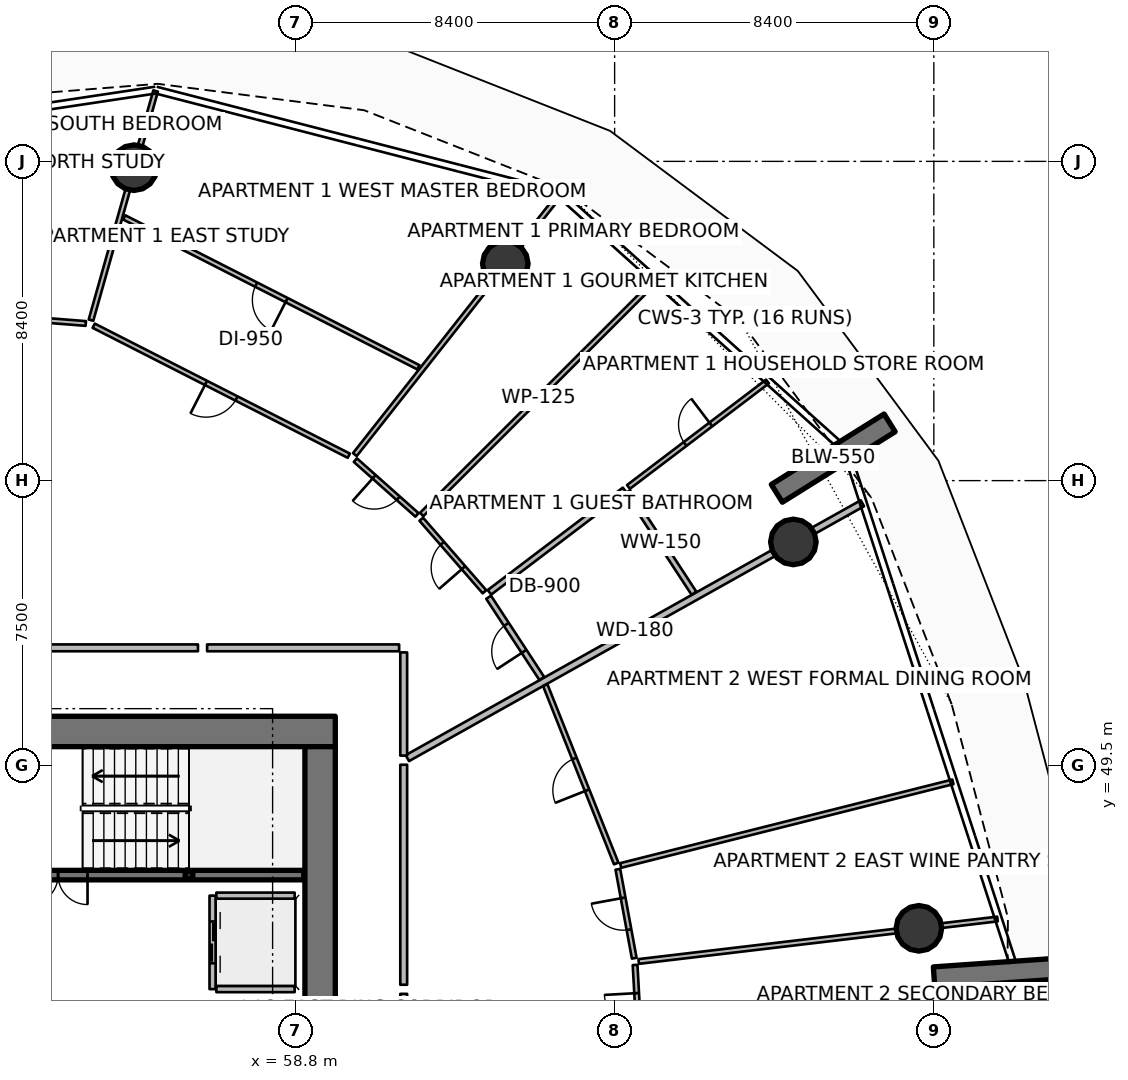
"""IFC4 building model, lengths in metres.
Left out: names, types, materials, properties, quantities, classifications, styles, units other than length and angle.
Written with IfcOpenShell. Run it as: python <this file> out.ifc"""

import sys

from ifc_helpers import new_model, si_unit, direction, frame, frame_2d, origin, origin_2d, place, context, subcontext, project, spatial, rectangle, hollow_rectangle, circle, extrude, element, fill, save


model = new_model("IFC4")
c1 = context("Model", 3, precision=1e-05, world=origin(), true_north=direction((0.0, 1.0)))
c2 = subcontext(c1, "Body", "Model", "MODEL_VIEW")
j1 = project(units=[si_unit("LENGTHUNIT", "METRE"), si_unit("PLANEANGLEUNIT", "RADIAN")], contexts=[c1])
p1 = place(None, origin())
s1 = spatial("IfcSite", under=j1, at=p1, CompositionType="ELEMENT")
p2 = place(p1, origin())
s2 = spatial("IfcBuilding", under=s1, at=p2, CompositionType="ELEMENT")
p3 = place(p2, frame((0.0, 0.0, 75.15)))
s3 = spatial("IfcBuildingStorey", under=s2, at=p3, CompositionType="ELEMENT", Elevation=75.15)
p4 = place(p3, frame((49.95, 50.4, 0.0), z_axis=(0.0, 0.0, 1.0), x_axis=(1.0, 0.0, 0.0)))
e1 = element("IfcWall", 1, at=p4, inside=s3, PredefinedType="SHEAR", context=c2, shape_type="SweptSolid", body=[
    extrude(rectangle(XDim=9.9, YDim=0.8, at=frame_2d((4.95, 0.0))), origin(), (0.0, 0.0, 1.0), 3.75),
])
p5 = place(p3, frame((59.45, 34.0, 0.0), z_axis=(0.0, 0.0, 1.0), x_axis=(0.0, 1.0, 0.0)))
e2 = element("IfcWall", 2, at=p5, inside=s3, PredefinedType="SHEAR", context=c2, shape_type="SweptSolid", body=[
    extrude(rectangle(XDim=16.0, YDim=0.8, at=frame_2d((8.0, 0.0))), origin(), (0.0, 0.0, 1.0), 3.75),
])
p6 = place(p3, frame((56.0, 46.62, 0.0), z_axis=(0.0, 0.0, 1.0), x_axis=(1.0, 0.0, 0.0)))
e3 = element("IfcColumn", 3, at=p6, inside=s3, PredefinedType="COLUMN", context=c2, shape_type="SweptSolid", body=[
    extrude(hollow_rectangle(XDim=0.2, YDim=0.2, WallThickness=0.01, InnerFilletRadius=0.01, OuterFilletRadius=0.02, at=origin_2d()), origin(), (0.0, 0.0, 1.0), 1.67),
])
for number, where, z_axis, x_axis in (
    (4, (71.469, 56.665, 0.0), (0.0, 0.0, 1.0), (0.848, 0.53, 0.0)),
    (5, (75.606, 43.93, 0.0), (0.0, 0.0, 1.0), (0.998, 0.07, 0.0)),
):
    element("IfcWall", number, at=place(p3, frame(where, z_axis=z_axis, x_axis=x_axis)), inside=s3, PredefinedType="SOLIDWALL", context=c2, shape_type="SweptSolid", body=[
        extrude(rectangle(XDim=3.5, YDim=0.55, at=frame_2d((1.75, 0.0))), origin(), (0.0, 0.0, 1.0), 3.75),
    ])
for number, where, z_axis, x_axis in (
    (6, (71.903, 55.386, 0.0), (0.0, 0.0, 1.0), (1.0, 0.0, 0.0)),
    (7, (64.323, 62.706, 0.0), (0.0, 0.0, 1.0), (1.0, 0.0, 0.0)),
    (8, (54.553, 65.234, 0.0), (0.0, 0.0, 1.0), (1.0, 0.0, 0.0)),
    (9, (75.207, 45.22, 0.0), (0.0, 0.0, 1.0), (1.0, 0.0, 0.0)),
):
    element("IfcColumn", number, at=place(p3, frame(where, z_axis=z_axis, x_axis=x_axis)), inside=s3, PredefinedType="COLUMN", context=c2, shape_type="SweptSolid", body=[
        extrude(circle(Radius=0.6, at=origin_2d()), origin(), (0.0, 0.0, 1.0), 3.5),
    ])
p7 = place(p3, frame((51.48, 46.62, 0.0), z_axis=(0.0, 0.0, 1.0), x_axis=(1.0, 0.0, 0.0)))
e10 = element("IfcWall", 10, at=p7, inside=s3, PredefinedType="SOLIDWALL", context=c2, shape_type="SweptSolid", body=[
    extrude(rectangle(XDim=7.54, YDim=0.25, at=frame_2d((3.77, 0.0))), origin(), (0.0, 0.0, 1.0), 3.5),
])
p8 = place(p7, frame((0.3, 0.0, 0.0)))
e11 = element("IfcOpeningElement", 11, at=p8, cuts=e10, PredefinedType="OPENING", context=c2, shape_type="SweptSolid", body=[
    extrude(rectangle(XDim=1.55, YDim=2.15, at=frame_2d((0.775, 1.075))), frame((0.0, 0.135, 0.0), z_axis=(0.0, -1.0, 0.0), x_axis=(1.0, 0.0, 0.0)), (0.0, 0.0, 1.0), 0.27),
])
p9 = place(p3, frame((56.62, 46.08, 0.0), z_axis=(0.0, 0.0, 1.0), x_axis=(0.0, -1.0, 0.0)))
e12 = element("IfcWall", 12, at=p9, inside=s3, PredefinedType="PARTITIONING", context=c2, shape_type="SweptSolid", body=[
    extrude(rectangle(XDim=2.46, YDim=0.16, at=frame_2d((1.23, 0.0))), origin(), (0.0, 0.0, 1.0), 3.5),
])
p10 = place(p9, frame((0.68, 0.0, 0.0)))
e13 = element("IfcOpeningElement", 13, at=p10, cuts=e12, PredefinedType="OPENING", context=c2, shape_type="SweptSolid", body=[
    extrude(rectangle(XDim=1.1, YDim=2.1, at=frame_2d((0.55, 1.05))), frame((0.0, 0.09, 0.0), z_axis=(0.0, -1.0, 0.0), x_axis=(1.0, 0.0, 0.0)), (0.0, 0.0, 1.0), 0.18),
])
for number, where, z_axis, x_axis in (
    (14, (56.72, 46.08, 0.0), (0.0, 0.0, 1.0), (1.0, 0.0, 0.0)),
    (15, (56.72, 43.62, 0.0), (0.0, 0.0, 1.0), (1.0, 0.0, 0.0)),
):
    element("IfcWall", number, at=place(p3, frame(where, z_axis=z_axis, x_axis=x_axis)), inside=s3, PredefinedType="PARTITIONING", context=c2, shape_type="SweptSolid", body=[
        extrude(rectangle(XDim=2.06, YDim=0.16, at=frame_2d((1.03, 0.0))), origin(), (0.0, 0.0, 1.0), 3.5),
    ])
p11 = place(p3, frame((61.746, 49.698, 0.0), z_axis=(0.0, 0.0, 1.0), x_axis=(0.872489938668, 0.488632077256, 0.0)))
e16 = element("IfcWall", 16, at=p11, inside=s3, PredefinedType="PARTITIONING", context=c2, shape_type="SweptSolid", body=[
    extrude(rectangle(XDim=13.725, YDim=0.18, at=frame_2d((6.862, 0.0))), origin(), (0.0, 0.0, 1.0), 2.94),
])
p12 = place(p3, frame((61.65, 49.764, 0.0), z_axis=(0.0, 0.0, 1.0), x_axis=(0.0, 1.0, 0.0)))
e17 = element("IfcWall", 17, at=p12, inside=s3, PredefinedType="PARTITIONING", context=c2, shape_type="SweptSolid", body=[
    extrude(rectangle(XDim=2.716, YDim=0.18, at=frame_2d((1.358, 0.0))), origin(), (0.0, 0.0, 1.0), 2.94),
])
p13 = place(p3, frame((61.53, 52.6, 0.0), z_axis=(0.0, 0.0, 1.0), x_axis=(-1.0, 0.0, 0.0)))
e18 = element("IfcWall", 18, at=p13, inside=s3, PredefinedType="PARTITIONING", context=c2, shape_type="SweptSolid", body=[
    extrude(rectangle(XDim=5.054, YDim=0.18, at=frame_2d((2.527, 0.0))), origin(), (0.0, 0.0, 1.0), 2.94),
])
p14 = place(p3, frame((65.283, 51.794, 0.0), z_axis=(0.0, 0.0, 1.0), x_axis=(-0.547733379914, 0.836652941505, 0.0)))
e19 = element("IfcWall", 19, at=p14, inside=s3, PredefinedType="PARTITIONING", context=c2, shape_type="SweptSolid", body=[
    extrude(rectangle(XDim=2.554, YDim=0.15, at=frame_2d((1.277, 0.0))), origin(), (0.0, 0.0, 1.0), 2.94),
])
p15 = place(p14, frame((0.852, 0.0, 0.0)))
e20 = element("IfcOpeningElement", 20, at=p15, cuts=e19, PredefinedType="OPENING", context=c2, shape_type="SweptSolid", body=[
    extrude(rectangle(XDim=0.85, YDim=2.06, at=frame_2d((0.425, 1.03))), frame((0.0, 0.085, 0.0), z_axis=(0.0, -1.0, 0.0), x_axis=(1.0, 0.0, 0.0)), (0.0, 0.0, 1.0), 0.17),
])
p16 = place(p3, frame((69.288, 54.036, 0.0), z_axis=(0.0, 0.0, 1.0), x_axis=(-0.547701082521, 0.836674084818, 0.0)))
e21 = element("IfcWall", 21, at=p16, inside=s3, PredefinedType="PARTITIONING", context=c2, shape_type="SweptSolid", body=[
    extrude(rectangle(XDim=3.188, YDim=0.15, at=frame_2d((1.594, 0.0))), origin(), (0.0, 0.0, 1.0), 2.94),
])
p17 = place(p3, frame((63.906, 54.061, 0.0), z_axis=(0.0, 0.0, 1.0), x_axis=(0.796875731809, 0.604143251269, 0.0)))
e22 = element("IfcWall", 22, at=p17, inside=s3, PredefinedType="PARTITIONING", context=c2, shape_type="SweptSolid", body=[
    extrude(rectangle(XDim=4.46, YDim=0.15, at=frame_2d((2.23, 0.0))), origin(), (0.0, 0.0, 1.0), 2.94),
])
p18 = place(p3, frame((67.564, 56.834, 0.0), z_axis=(0.0, 0.0, 1.0), x_axis=(0.796836075133, 0.604195555567, 0.0)))
e23 = element("IfcWall", 23, at=p18, inside=s3, PredefinedType="PARTITIONING", context=c2, shape_type="SweptSolid", body=[
    extrude(rectangle(XDim=4.59, YDim=0.125, at=frame_2d((2.295, 0.0))), origin(), (0.0, 0.0, 1.0), 2.94),
])
p19 = place(p18, frame((1.87, 0.0, 0.0)))
e24 = element("IfcOpeningElement", 24, at=p19, cuts=e23, PredefinedType="OPENING", context=c2, shape_type="SweptSolid", body=[
    extrude(rectangle(XDim=0.85, YDim=2.06, at=frame_2d((0.425, 1.03))), frame((0.0, 0.073, 0.0), z_axis=(0.0, -1.0, 0.0), x_axis=(1.0, 0.0, 0.0)), (0.0, 0.0, 1.0), 0.145),
])
p20 = place(p3, frame((62.123, 56.108, 0.0), z_axis=(0.0, 0.0, 1.0), x_axis=(0.707471753943, 0.706741619953, 0.0)))
e25 = element("IfcWall", 25, at=p20, inside=s3, PredefinedType="PARTITIONING", context=c2, shape_type="SweptSolid", body=[
    extrude(rectangle(XDim=8.694, YDim=0.125, at=frame_2d((4.347, 0.0))), origin(), (0.0, 0.0, 1.0), 2.94),
])
p21 = place(p3, frame((63.776, 54.074, 0.0), z_axis=(0.0, 0.0, 1.0), x_axis=(-0.657015843491, 0.753876768048, 0.0)))
e26 = element("IfcWall", 26, at=p21, inside=s3, PredefinedType="PARTITIONING", context=c2, shape_type="SweptSolid", body=[
    extrude(rectangle(XDim=2.533, YDim=0.125, at=frame_2d((1.267, 0.0))), origin(), (0.0, 0.0, 1.0), 2.94),
])
p22 = place(p21, frame((0.842, 0.0, 0.0)))
e27 = element("IfcOpeningElement", 27, at=p22, cuts=e26, PredefinedType="OPENING", context=c2, shape_type="SweptSolid", body=[
    extrude(rectangle(XDim=0.85, YDim=2.06, at=frame_2d((0.425, 1.03))), frame((0.0, 0.073, 0.0), z_axis=(0.0, -1.0, 0.0), x_axis=(1.0, 0.0, 0.0)), (0.0, 0.0, 1.0), 0.145),
])
p23 = place(p3, frame((61.999, 56.097, 0.0), z_axis=(0.0, 0.0, 1.0), x_axis=(-0.747347245647, 0.664433664427, 0.0)))
e28 = element("IfcWall", 28, at=p23, inside=s3, PredefinedType="PARTITIONING", context=c2, shape_type="SweptSolid", body=[
    extrude(rectangle(XDim=2.17, YDim=0.125, at=frame_2d((1.085, 0.0))), origin(), (0.0, 0.0, 1.0), 2.94),
])
p24 = place(p23, frame((0.66, 0.0, 0.0)))
e29 = element("IfcOpeningElement", 29, at=p24, cuts=e28, PredefinedType="OPENING", context=c2, shape_type="SweptSolid", body=[
    extrude(rectangle(XDim=0.85, YDim=2.06, at=frame_2d((0.425, 1.03))), frame((0.0, 0.073, 0.0), z_axis=(0.0, -1.0, 0.0), x_axis=(1.0, 0.0, 0.0)), (0.0, 0.0, 1.0), 0.145),
])
p25 = place(p3, frame((56.236, 52.6, 0.0), z_axis=(0.0, 0.0, 1.0), x_axis=(-1.0, 0.0, 0.0)))
e30 = element("IfcWall", 30, at=p25, inside=s3, PredefinedType="PARTITIONING", context=c2, shape_type="SweptSolid", body=[
    extrude(rectangle(XDim=5.127, YDim=0.18, at=frame_2d((2.563, 0.0))), origin(), (0.0, 0.0, 1.0), 2.94),
])
p26 = place(p3, frame((60.365, 57.684, 0.0), z_axis=(0.0, 0.0, 1.0), x_axis=(0.619089966413, 0.785320070727, 0.0)))
e31 = element("IfcWall", 31, at=p26, inside=s3, PredefinedType="PARTITIONING", context=c2, shape_type="SweptSolid", body=[
    extrude(rectangle(XDim=8.699, YDim=0.125, at=frame_2d((4.35, 0.0))), origin(), (0.0, 0.0, 1.0), 2.94),
])
p27 = place(p3, frame((60.205, 57.656, 0.0), z_axis=(0.0, 0.0, 1.0), x_axis=(-0.891005117697, 0.453993260123, 0.0)))
e32 = element("IfcWall", 32, at=p27, inside=s3, PredefinedType="PARTITIONING", context=c2, shape_type="SweptSolid", body=[
    extrude(rectangle(XDim=7.533, YDim=0.125, at=frame_2d((3.767, 0.0))), origin(), (0.0, 0.0, 1.0), 2.94),
])
p28 = place(p27, frame((3.317, 0.0, 0.0)))
e33 = element("IfcOpeningElement", 33, at=p28, cuts=e32, PredefinedType="OPENING", context=c2, shape_type="SweptSolid", body=[
    extrude(rectangle(XDim=0.9, YDim=2.08, at=frame_2d((0.45, 1.04))), frame((0.0, 0.073, 0.0), z_axis=(0.0, -1.0, 0.0), x_axis=(1.0, 0.0, 0.0)), (0.0, 0.0, 1.0), 0.145),
])
p29 = place(p3, frame((62.038, 59.981, 0.0), z_axis=(0.0, 0.0, 1.0), x_axis=(-0.891001540604, 0.454000280442, 0.0)))
e34 = element("IfcWall", 34, at=p29, inside=s3, PredefinedType="PARTITIONING", context=c2, shape_type="SweptSolid", body=[
    extrude(rectangle(XDim=8.689, YDim=0.125, at=frame_2d((4.344, 0.0))), origin(), (0.0, 0.0, 1.0), 2.94),
])
p30 = place(p29, frame((3.895, 0.0, 0.0)))
e35 = element("IfcOpeningElement", 35, at=p30, cuts=e34, PredefinedType="OPENING", context=c2, shape_type="SweptSolid", body=[
    extrude(rectangle(XDim=0.9, YDim=2.08, at=frame_2d((0.45, 1.04))), frame((0.0, 0.073, 0.0), z_axis=(0.0, -1.0, 0.0), x_axis=(1.0, 0.0, 0.0)), (0.0, 0.0, 1.0), 0.145),
])
p31 = place(p3, frame((53.421, 61.222, 0.0), z_axis=(0.0, 0.0, 1.0), x_axis=(0.271462015929, 0.962449153934, 0.0)))
e36 = element("IfcWall", 36, at=p31, inside=s3, PredefinedType="PARTITIONING", context=c2, shape_type="SweptSolid", body=[
    extrude(rectangle(XDim=6.266, YDim=0.125, at=frame_2d((3.133, 0.0))), origin(), (0.0, 0.0, 1.0), 2.94),
])
p32 = place(p3, frame((53.284, 61.135, 0.0), z_axis=(0.0, 0.0, 1.0), x_axis=(-0.99691758874, 0.078455855487, 0.0)))
e37 = element("IfcWall", 37, at=p32, inside=s3, PredefinedType="PARTITIONING", context=c2, shape_type="SweptSolid", body=[
    extrude(rectangle(XDim=7.534, YDim=0.125, at=frame_2d((3.767, 0.0))), origin(), (0.0, 0.0, 1.0), 2.94),
])
p33 = place(p32, frame((3.317, 0.0, 0.0)))
e38 = element("IfcOpeningElement", 38, at=p33, cuts=e37, PredefinedType="OPENING", context=c2, shape_type="SweptSolid", body=[
    extrude(rectangle(XDim=0.9, YDim=2.08, at=frame_2d((0.45, 1.04))), frame((0.0, 0.073, 0.0), z_axis=(0.0, -1.0, 0.0), x_axis=(1.0, 0.0, 0.0)), (0.0, 0.0, 1.0), 0.145),
])
p34 = place(p3, frame((53.956, 63.517, 0.0), z_axis=(0.0, 0.0, 1.0), x_axis=(-0.996916033705, 0.078475612404, 0.0)))
e39 = element("IfcWall", 39, at=p34, inside=s3, PredefinedType="PARTITIONING", context=c2, shape_type="SweptSolid", body=[
    extrude(rectangle(XDim=8.499, YDim=0.125, at=frame_2d((4.25, 0.0))), origin(), (0.0, 0.0, 1.0), 2.94),
])
p35 = place(p34, frame((3.8, 0.0, 0.0)))
e40 = element("IfcOpeningElement", 40, at=p35, cuts=e39, PredefinedType="OPENING", context=c2, shape_type="SweptSolid", body=[
    extrude(rectangle(XDim=0.9, YDim=2.08, at=frame_2d((0.45, 1.04))), frame((0.0, 0.073, 0.0), z_axis=(0.0, -1.0, 0.0), x_axis=(1.0, 0.0, 0.0)), (0.0, 0.0, 1.0), 0.145),
])
p36 = place(p3, frame((61.65, 38.27, 0.0), z_axis=(0.0, 0.0, 1.0), x_axis=(0.0, 1.0, 0.0)))
e41 = element("IfcWall", 41, at=p36, inside=s3, PredefinedType="PARTITIONING", context=c2, shape_type="SweptSolid", body=[
    extrude(rectangle(XDim=5.225, YDim=0.18, at=frame_2d((2.613, 0.0))), origin(), (0.0, 0.0, 1.0), 2.94),
])
p37 = place(p3, frame((67.867, 41.924, 0.0), z_axis=(0.0, 0.0, 1.0), x_axis=(-0.054879482566, 0.998492985651, 0.0)))
e42 = element("IfcWall", 42, at=p37, inside=s3, PredefinedType="PARTITIONING", context=c2, shape_type="SweptSolid", body=[
    extrude(rectangle(XDim=2.335, YDim=0.125, at=frame_2d((1.168, 0.0))), origin(), (0.0, 0.0, 1.0), 2.94),
])
p38 = place(p37, frame((0.743, 0.0, 0.0)))
e43 = element("IfcOpeningElement", 43, at=p38, cuts=e42, PredefinedType="OPENING", context=c2, shape_type="SweptSolid", body=[
    extrude(rectangle(XDim=0.85, YDim=2.06, at=frame_2d((0.425, 1.03))), frame((0.0, 0.073, 0.0), z_axis=(0.0, -1.0, 0.0), x_axis=(1.0, 0.0, 0.0)), (0.0, 0.0, 1.0), 0.145),
])
p39 = place(p3, frame((61.65, 43.736, 0.0), z_axis=(0.0, 0.0, 1.0), x_axis=(0.0, 1.0, 0.0)))
e44 = element("IfcWall", 44, at=p39, inside=s3, PredefinedType="PARTITIONING", context=c2, shape_type="SweptSolid", body=[
    extrude(rectangle(XDim=5.789, YDim=0.18, at=frame_2d((2.895, 0.0))), origin(), (0.0, 0.0, 1.0), 2.94),
])
p40 = place(p3, frame((67.833, 44.347, 0.0), z_axis=(0.0, 0.0, 1.0), x_axis=(0.993068855081, 0.11753403366, 0.0)))
e45 = element("IfcWall", 45, at=p40, inside=s3, PredefinedType="PARTITIONING", context=c2, shape_type="SweptSolid", body=[
    extrude(rectangle(XDim=9.507, YDim=0.125, at=frame_2d((4.754, 0.0))), origin(), (0.0, 0.0, 1.0), 2.94),
])
p41 = place(p3, frame((67.358, 46.873, 0.0), z_axis=(0.0, 0.0, 1.0), x_axis=(0.96974940846, 0.244102611193, 0.0)))
e46 = element("IfcWall", 46, at=p41, inside=s3, PredefinedType="PARTITIONING", context=c2, shape_type="SweptSolid", body=[
    extrude(rectangle(XDim=9.016, YDim=0.125, at=frame_2d((4.508, 0.0))), origin(), (0.0, 0.0, 1.0), 2.94),
])
p42 = place(p3, frame((67.716, 44.434, 0.0), z_axis=(0.0, 0.0, 1.0), x_axis=(-0.181225149504, 0.983441632832, 0.0)))
e47 = element("IfcWall", 47, at=p42, inside=s3, PredefinedType="PARTITIONING", context=c2, shape_type="SweptSolid", body=[
    extrude(rectangle(XDim=2.378, YDim=0.125, at=frame_2d((1.189, 0.0))), origin(), (0.0, 0.0, 1.0), 2.94),
])
p43 = place(p42, frame((0.764, 0.0, 0.0)))
e48 = element("IfcOpeningElement", 48, at=p43, cuts=e47, PredefinedType="OPENING", context=c2, shape_type="SweptSolid", body=[
    extrude(rectangle(XDim=0.85, YDim=2.06, at=frame_2d((0.425, 1.03))), frame((0.0, 0.073, 0.0), z_axis=(0.0, -1.0, 0.0), x_axis=(1.0, 0.0, 0.0)), (0.0, 0.0, 1.0), 0.145),
])
p44 = place(p3, frame((67.241, 46.926, 0.0), z_axis=(0.0, 0.0, 1.0), x_axis=(-0.369580809995, 0.929198592812, 0.0)))
e49 = element("IfcWall", 49, at=p44, inside=s3, PredefinedType="PARTITIONING", context=c2, shape_type="SweptSolid", body=[
    extrude(rectangle(XDim=5.049, YDim=0.125, at=frame_2d((2.524, 0.0))), origin(), (0.0, 0.0, 1.0), 2.94),
])
p45 = place(p44, frame((2.074, 0.0, 0.0)))
e50 = element("IfcOpeningElement", 50, at=p45, cuts=e49, PredefinedType="OPENING", context=c2, shape_type="SweptSolid", body=[
    extrude(rectangle(XDim=0.9, YDim=2.08, at=frame_2d((0.45, 1.04))), frame((0.0, 0.073, 0.0), z_axis=(0.0, -1.0, 0.0), x_axis=(1.0, 0.0, 0.0)), (0.0, 0.0, 1.0), 0.145),
])
p46 = place(p8, origin())
e51 = element("IfcDoor", 51, at=p46, inside=s3, OperationType="DOUBLE_DOOR_SINGLE_SWING", PredefinedType="DOOR", context=c2, shape_type="SweptSolid", body=[
    extrude(rectangle(XDim=1.55, YDim=2.15, at=frame_2d((0.775, 1.075))), frame((0.0, 0.025, 0.0), z_axis=(0.0, -1.0, 0.0), x_axis=(1.0, 0.0, 0.0)), (0.0, 0.0, 1.0), 0.05),
])
fill(e11, e51)
p47 = place(p10, origin())
e52 = element("IfcDoor", 52, at=p47, inside=s3, OperationType="DOUBLE_DOOR_SLIDING", PredefinedType="DOOR", context=c2, shape_type="SweptSolid", body=[
    extrude(rectangle(XDim=1.1, YDim=2.1, at=frame_2d((0.55, 1.05))), frame((0.0, 0.025, 0.0), z_axis=(0.0, -1.0, 0.0), x_axis=(1.0, 0.0, 0.0)), (0.0, 0.0, 1.0), 0.05),
])
fill(e13, e52)
p48 = place(p15, origin())
e53 = element("IfcDoor", 53, at=p48, inside=s3, OperationType="SINGLE_SWING_LEFT", PredefinedType="DOOR", context=c2, shape_type="SweptSolid", body=[
    extrude(rectangle(XDim=0.85, YDim=2.06, at=frame_2d((0.425, 1.03))), frame((0.0, 0.025, 0.0), z_axis=(0.0, -1.0, 0.0), x_axis=(1.0, 0.0, 0.0)), (0.0, 0.0, 1.0), 0.05),
])
fill(e20, e53)
p49 = place(p19, origin())
e54 = element("IfcDoor", 54, at=p49, inside=s3, OperationType="SINGLE_SWING_RIGHT", PredefinedType="DOOR", context=c2, shape_type="SweptSolid", body=[
    extrude(rectangle(XDim=0.85, YDim=2.06, at=frame_2d((0.425, 1.03))), frame((0.0, 0.025, 0.0), z_axis=(0.0, -1.0, 0.0), x_axis=(1.0, 0.0, 0.0)), (0.0, 0.0, 1.0), 0.05),
])
fill(e24, e54)
p50 = place(p22, origin())
e55 = element("IfcDoor", 55, at=p50, inside=s3, OperationType="SINGLE_SWING_LEFT", PredefinedType="DOOR", context=c2, shape_type="SweptSolid", body=[
    extrude(rectangle(XDim=0.85, YDim=2.06, at=frame_2d((0.425, 1.03))), frame((0.0, 0.025, 0.0), z_axis=(0.0, -1.0, 0.0), x_axis=(1.0, 0.0, 0.0)), (0.0, 0.0, 1.0), 0.05),
])
fill(e27, e55)
p51 = place(p24, origin())
e56 = element("IfcDoor", 56, at=p51, inside=s3, OperationType="SINGLE_SWING_RIGHT", PredefinedType="DOOR", context=c2, shape_type="SweptSolid", body=[
    extrude(rectangle(XDim=0.85, YDim=2.06, at=frame_2d((0.425, 1.03))), frame((0.0, 0.025, 0.0), z_axis=(0.0, -1.0, 0.0), x_axis=(1.0, 0.0, 0.0)), (0.0, 0.0, 1.0), 0.05),
])
fill(e29, e56)
p52 = place(p28, origin())
e57 = element("IfcDoor", 57, at=p52, inside=s3, OperationType="SINGLE_SWING_RIGHT", PredefinedType="DOOR", context=c2, shape_type="SweptSolid", body=[
    extrude(rectangle(XDim=0.9, YDim=2.08, at=frame_2d((0.45, 1.04))), frame((0.0, 0.025, 0.0), z_axis=(0.0, -1.0, 0.0), x_axis=(1.0, 0.0, 0.0)), (0.0, 0.0, 1.0), 0.05),
])
fill(e33, e57)
p53 = place(p30, origin())
e58 = element("IfcDoor", 58, at=p53, inside=s3, OperationType="SINGLE_SWING_LEFT", PredefinedType="DOOR", context=c2, shape_type="SweptSolid", body=[
    extrude(rectangle(XDim=0.9, YDim=2.08, at=frame_2d((0.45, 1.04))), frame((0.0, 0.025, 0.0), z_axis=(0.0, -1.0, 0.0), x_axis=(1.0, 0.0, 0.0)), (0.0, 0.0, 1.0), 0.05),
])
fill(e35, e58)
p54 = place(p38, origin())
e59 = element("IfcDoor", 59, at=p54, inside=s3, OperationType="SINGLE_SWING_RIGHT", PredefinedType="DOOR", context=c2, shape_type="SweptSolid", body=[
    extrude(rectangle(XDim=0.85, YDim=2.06, at=frame_2d((0.425, 1.03))), frame((0.0, 0.025, 0.0), z_axis=(0.0, -1.0, 0.0), x_axis=(1.0, 0.0, 0.0)), (0.0, 0.0, 1.0), 0.05),
])
fill(e43, e59)
p55 = place(p43, origin())
e60 = element("IfcDoor", 60, at=p55, inside=s3, OperationType="SINGLE_SWING_RIGHT", PredefinedType="DOOR", context=c2, shape_type="SweptSolid", body=[
    extrude(rectangle(XDim=0.85, YDim=2.06, at=frame_2d((0.425, 1.03))), frame((0.0, 0.025, 0.0), z_axis=(0.0, -1.0, 0.0), x_axis=(1.0, 0.0, 0.0)), (0.0, 0.0, 1.0), 0.05),
])
fill(e48, e60)
p56 = place(p45, origin())
e61 = element("IfcDoor", 61, at=p56, inside=s3, OperationType="SINGLE_SWING_LEFT", PredefinedType="DOOR", context=c2, shape_type="SweptSolid", body=[
    extrude(rectangle(XDim=0.9, YDim=2.08, at=frame_2d((0.45, 1.04))), frame((0.0, 0.025, 0.0), z_axis=(0.0, -1.0, 0.0), x_axis=(1.0, 0.0, 0.0)), (0.0, 0.0, 1.0), 0.05),
])
fill(e50, e61)
save(model, sys.argv[1])
